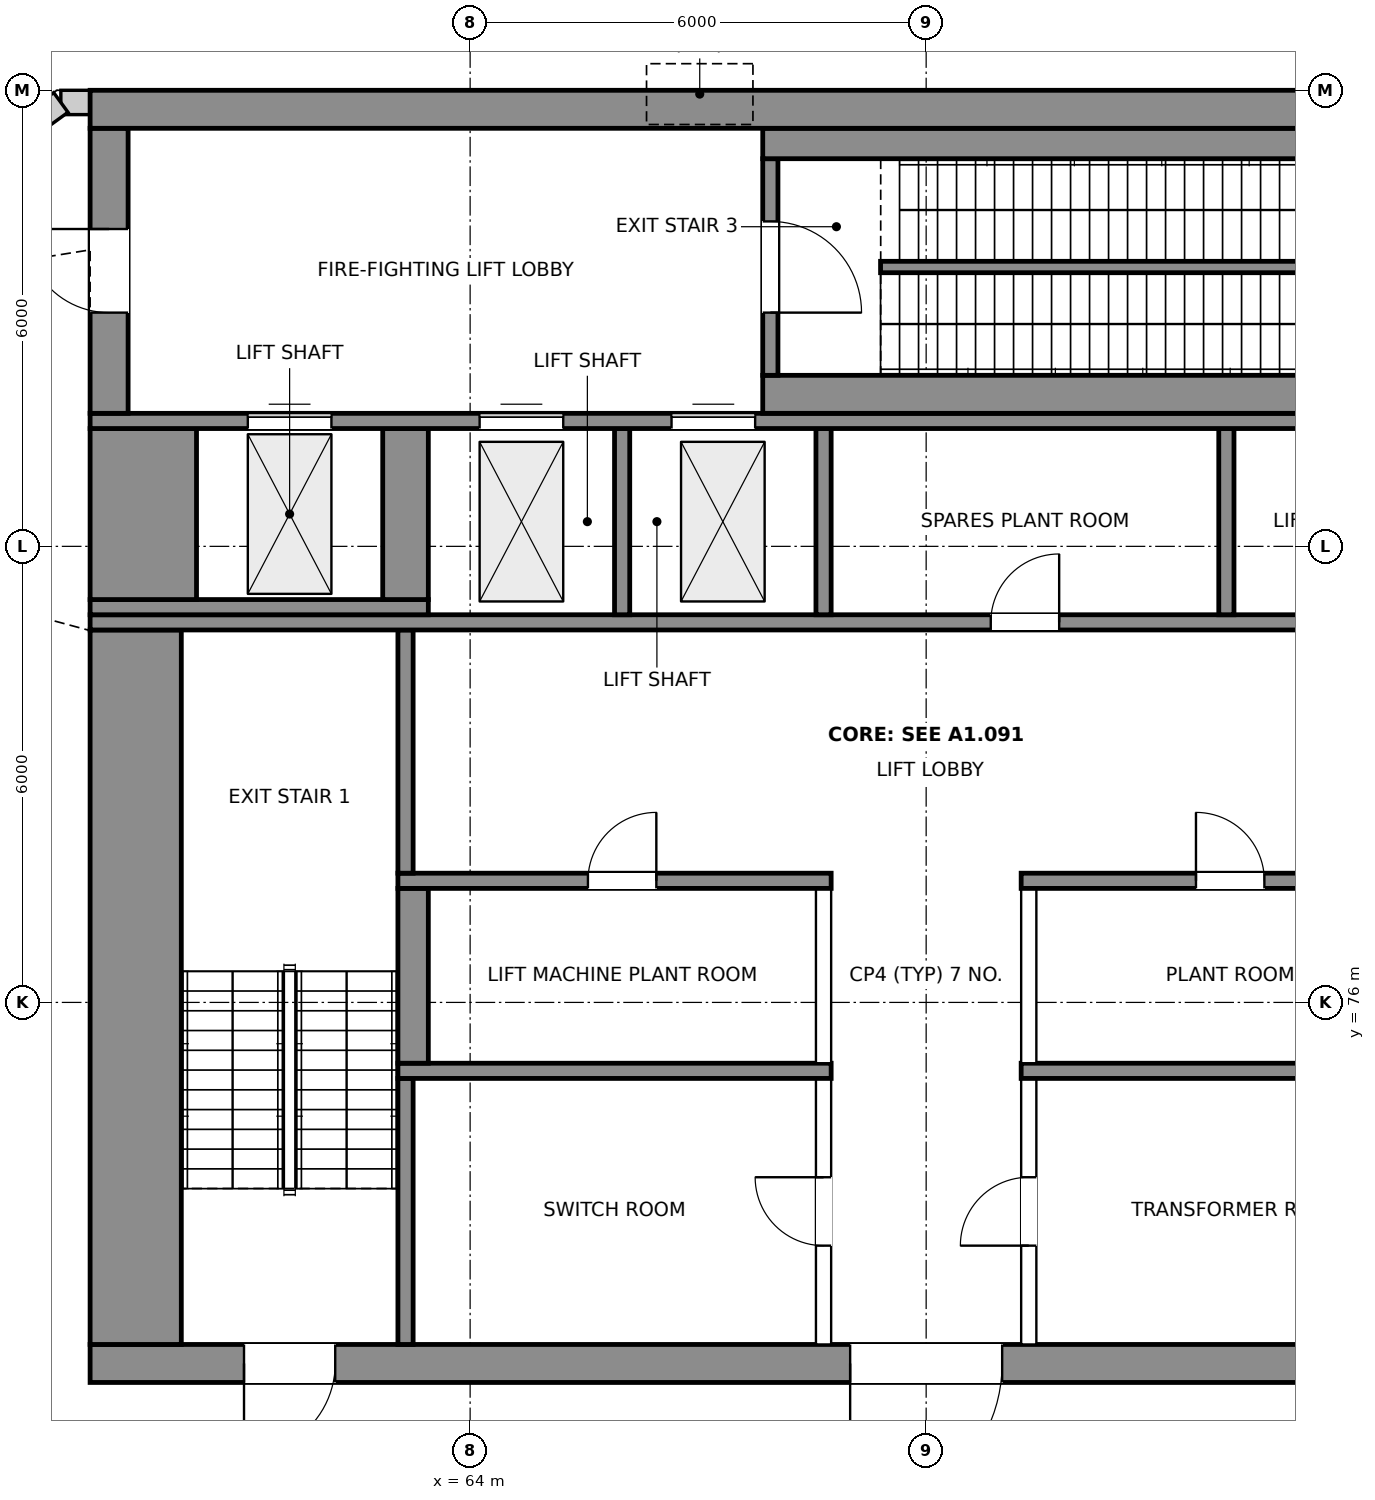
"""IFC4 building model, lengths in metres.
Left out: names, types, materials, properties, quantities, classifications, styles, units other than length and angle.
Written with IfcOpenShell. Run it as: python <this file> out.ifc"""

import sys

from ifc_helpers import new_model, si_unit, direction, frame, frame_2d, origin, place, context, subcontext, project, spatial, rectangle, extrude, element, fill, save


model = new_model("IFC4")
c1 = context("Model", 3, precision=1e-05, world=origin(), true_north=direction((0.0, 1.0)))
c2 = subcontext(c1, "Body", "Model", "MODEL_VIEW")
j1 = project(units=[si_unit("LENGTHUNIT", "METRE"), si_unit("PLANEANGLEUNIT", "RADIAN")], contexts=[c1])
p1 = place(None, origin())
s1 = spatial("IfcSite", under=j1, at=p1, CompositionType="ELEMENT")
p2 = place(p1, origin())
s2 = spatial("IfcBuilding", under=s1, at=p2, CompositionType="ELEMENT")
p3 = place(p2, frame((0.0, 0.0, 328.7)))
s3 = spatial("IfcBuildingStorey", under=s2, at=p3, CompositionType="ELEMENT", Elevation=328.7)
p4 = place(p3, frame((59.0, 87.84, 0.0), z_axis=(0.0, 0.0, 1.0), x_axis=(-1.0, 0.0, 0.0)))
e1 = element("IfcWall", 1, at=p4, inside=s3, PredefinedType="SOLIDWALL", context=c2, shape_type="SweptSolid", body=[
    extrude(rectangle(XDim=0.385, YDim=0.32, at=frame_2d((0.192, 0.0))), origin(), (0.0, 0.0, 1.0), 4.2),
])
p5 = place(p3, frame((58.615, 87.84, 0.0), z_axis=(0.0, 0.0, 1.0), x_axis=(-0.809014901919, -0.5877881323, 0.0)))
e2 = element("IfcWall", 2, at=p5, inside=s3, PredefinedType="SOLIDWALL", context=c2, shape_type="SweptSolid", body=[
    extrude(rectangle(XDim=5.678, YDim=0.32, at=frame_2d((2.839, 0.0))), origin(), (0.0, 0.0, 1.0), 4.2),
])
p6 = place(p3, frame((59.0, 71.25, 0.0), z_axis=(0.0, 0.0, 1.0), x_axis=(1.0, 0.0, 0.0)))
e3 = element("IfcWall", 3, at=p6, inside=s3, PredefinedType="SHEAR", context=c2, shape_type="SweptSolid", body=[
    extrude(rectangle(XDim=22.0, YDim=0.5, at=frame_2d((11.0, 0.0))), origin(), (0.0, 0.0, 1.0), 4.5),
])
p7 = place(p6, frame((2.025, 0.0, 0.0)))
e4 = element("IfcOpeningElement", 4, at=p7, cuts=e3, PredefinedType="OPENING", context=c2, shape_type="SweptSolid", body=[
    extrude(rectangle(XDim=1.2, YDim=2.1, at=frame_2d((0.6, 1.05))), frame((0.0, 0.26, 0.0), z_axis=(0.0, -1.0, 0.0), x_axis=(1.0, 0.0, 0.0)), (0.0, 0.0, 1.0), 0.52),
])
p8 = place(p6, frame((18.775, 0.0, 0.0)))
e5 = element("IfcOpeningElement", 5, at=p8, cuts=e3, PredefinedType="OPENING", context=c2, shape_type="SweptSolid", body=[
    extrude(rectangle(XDim=1.2, YDim=2.1, at=frame_2d((0.6, 1.05))), frame((0.0, 0.26, 0.0), z_axis=(0.0, -1.0, 0.0), x_axis=(1.0, 0.0, 0.0)), (0.0, 0.0, 1.0), 0.52),
])
p9 = place(p6, frame((10.0, 0.0, 0.0)))
e6 = element("IfcOpeningElement", 6, at=p9, cuts=e3, PredefinedType="OPENING", context=c2, shape_type="SweptSolid", body=[
    extrude(rectangle(XDim=2.0, YDim=2.1, at=frame_2d((1.0, 1.05))), frame((0.0, 0.26, 0.0), z_axis=(0.0, -1.0, 0.0), x_axis=(1.0, 0.0, 0.0)), (0.0, 0.0, 1.0), 0.52),
])
p10 = place(p3, frame((59.6, 71.5, 0.0), z_axis=(0.0, 0.0, 1.0), x_axis=(0.0, 1.0, 0.0)))
e7 = element("IfcWall", 7, at=p10, inside=s3, PredefinedType="SHEAR", context=c2, shape_type="SweptSolid", body=[
    extrude(rectangle(XDim=9.4, YDim=1.2, at=frame_2d((4.7, 0.0))), origin(), (0.0, 0.0, 1.0), 4.5),
])
p11 = place(p3, frame((63.15, 71.5, 0.0), z_axis=(0.0, 0.0, 1.0), x_axis=(0.0, 1.0, 0.0)))
e8 = element("IfcWall", 8, at=p11, inside=s3, PredefinedType="SHEAR", context=c2, shape_type="SweptSolid", body=[
    extrude(rectangle(XDim=3.5, YDim=0.2, at=frame_2d((1.75, 0.0))), origin(), (0.0, 0.0, 1.0), 4.5),
])
p12 = place(p3, frame((68.65, 71.5, 0.0), z_axis=(0.0, 0.0, 1.0), x_axis=(0.0, 1.0, 0.0)))
e9 = element("IfcWall", 9, at=p12, inside=s3, PredefinedType="PARTITIONING", context=c2, shape_type="SweptSolid", body=[
    extrude(rectangle(XDim=3.5, YDim=0.2, at=frame_2d((1.75, 0.0))), origin(), (0.0, 0.0, 1.0), 4.2),
])
p13 = place(p12, frame((1.3, 0.0, 0.0)))
e10 = element("IfcOpeningElement", 10, at=p13, cuts=e9, PredefinedType="OPENING", context=c2, shape_type="SweptSolid", body=[
    extrude(rectangle(XDim=0.9, YDim=2.1, at=frame_2d((0.45, 1.05))), frame((0.0, 0.11, 0.0), z_axis=(0.0, -1.0, 0.0), x_axis=(1.0, 0.0, 0.0)), (0.0, 0.0, 1.0), 0.22),
])
p14 = place(p3, frame((71.35, 71.5, 0.0), z_axis=(0.0, 0.0, 1.0), x_axis=(0.0, 1.0, 0.0)))
e11 = element("IfcWall", 11, at=p14, inside=s3, PredefinedType="PARTITIONING", context=c2, shape_type="SweptSolid", body=[
    extrude(rectangle(XDim=3.5, YDim=0.2, at=frame_2d((1.75, 0.0))), origin(), (0.0, 0.0, 1.0), 4.2),
])
p15 = place(p14, frame((1.3, 0.0, 0.0)))
e12 = element("IfcOpeningElement", 12, at=p15, cuts=e11, PredefinedType="OPENING", context=c2, shape_type="SweptSolid", body=[
    extrude(rectangle(XDim=0.9, YDim=2.1, at=frame_2d((0.45, 1.05))), frame((0.0, 0.11, 0.0), z_axis=(0.0, -1.0, 0.0), x_axis=(1.0, 0.0, 0.0)), (0.0, 0.0, 1.0), 0.22),
])
for number, where, z_axis, x_axis in (
    (13, (63.05, 75.1, 0.0), (0.0, 0.0, 1.0), (1.0, 0.0, 0.0)),
    (14, (71.25, 75.1, 0.0), (0.0, 0.0, 1.0), (1.0, 0.0, 0.0)),
):
    element("IfcWall", number, at=place(p3, frame(where, z_axis=z_axis, x_axis=x_axis)), inside=s3, PredefinedType="SHEAR", context=c2, shape_type="SweptSolid", body=[
        extrude(rectangle(XDim=5.7, YDim=0.2, at=frame_2d((2.85, 0.0))), origin(), (0.0, 0.0, 1.0), 4.5),
    ])
p16 = place(p3, frame((63.25, 75.2, 0.0), z_axis=(0.0, 0.0, 1.0), x_axis=(0.0, 1.0, 0.0)))
e15 = element("IfcWall", 15, at=p16, inside=s3, PredefinedType="SHEAR", context=c2, shape_type="SweptSolid", body=[
    extrude(rectangle(XDim=2.3, YDim=0.4, at=frame_2d((1.15, 0.0))), origin(), (0.0, 0.0, 1.0), 4.5),
])
for number, where, z_axis, x_axis in (
    (16, (68.65, 75.2, 0.0), (0.0, 0.0, 1.0), (0.0, 1.0, 0.0)),
    (17, (71.35, 75.2, 0.0), (0.0, 0.0, 1.0), (0.0, 1.0, 0.0)),
):
    element("IfcWall", number, at=place(p3, frame(where, z_axis=z_axis, x_axis=x_axis)), inside=s3, PredefinedType="PARTITIONING", context=c2, shape_type="SweptSolid", body=[
        extrude(rectangle(XDim=2.3, YDim=0.2, at=frame_2d((1.15, 0.0))), origin(), (0.0, 0.0, 1.0), 4.2),
    ])
p17 = place(p3, frame((63.05, 77.6, 0.0), z_axis=(0.0, 0.0, 1.0), x_axis=(1.0, 0.0, 0.0)))
e18 = element("IfcWall", 18, at=p17, inside=s3, PredefinedType="SHEAR", context=c2, shape_type="SweptSolid", body=[
    extrude(rectangle(XDim=5.7, YDim=0.2, at=frame_2d((2.85, 0.0))), origin(), (0.0, 0.0, 1.0), 4.5),
])
p18 = place(p17, frame((2.5, 0.0, 0.0)))
e19 = element("IfcOpeningElement", 19, at=p18, cuts=e18, PredefinedType="OPENING", context=c2, shape_type="SweptSolid", body=[
    extrude(rectangle(XDim=0.9, YDim=2.1, at=frame_2d((0.45, 1.05))), frame((0.0, 0.11, 0.0), z_axis=(0.0, -1.0, 0.0), x_axis=(1.0, 0.0, 0.0)), (0.0, 0.0, 1.0), 0.22),
])
p19 = place(p3, frame((71.25, 77.6, 0.0), z_axis=(0.0, 0.0, 1.0), x_axis=(1.0, 0.0, 0.0)))
e20 = element("IfcWall", 20, at=p19, inside=s3, PredefinedType="SHEAR", context=c2, shape_type="SweptSolid", body=[
    extrude(rectangle(XDim=5.7, YDim=0.2, at=frame_2d((2.85, 0.0))), origin(), (0.0, 0.0, 1.0), 4.5),
])
p20 = place(p19, frame((2.3, 0.0, 0.0)))
e21 = element("IfcOpeningElement", 21, at=p20, cuts=e20, PredefinedType="OPENING", context=c2, shape_type="SweptSolid", body=[
    extrude(rectangle(XDim=0.9, YDim=2.1, at=frame_2d((0.45, 1.05))), frame((0.0, 0.11, 0.0), z_axis=(0.0, -1.0, 0.0), x_axis=(1.0, 0.0, 0.0)), (0.0, 0.0, 1.0), 0.22),
])
p21 = place(p3, frame((63.15, 77.7, 0.0), z_axis=(0.0, 0.0, 1.0), x_axis=(0.0, 1.0, 0.0)))
e22 = element("IfcWall", 22, at=p21, inside=s3, PredefinedType="SHEAR", context=c2, shape_type="SweptSolid", body=[
    extrude(rectangle(XDim=3.2, YDim=0.2, at=frame_2d((1.6, 0.0))), origin(), (0.0, 0.0, 1.0), 4.5),
])
p22 = place(p3, frame((59.0, 81.0, 0.0), z_axis=(0.0, 0.0, 1.0), x_axis=(1.0, 0.0, 0.0)))
e23 = element("IfcWall", 23, at=p22, inside=s3, PredefinedType="SHEAR", context=c2, shape_type="SweptSolid", body=[
    extrude(rectangle(XDim=22.0, YDim=0.2, at=frame_2d((11.0, 0.0))), origin(), (0.0, 0.0, 1.0), 4.5),
])
p23 = place(p22, frame((11.85, 0.0, 0.0)))
e24 = element("IfcOpeningElement", 24, at=p23, cuts=e23, PredefinedType="OPENING", context=c2, shape_type="SweptSolid", body=[
    extrude(rectangle(XDim=0.9, YDim=2.1, at=frame_2d((0.45, 1.05))), frame((0.0, 0.11, 0.0), z_axis=(0.0, -1.0, 0.0), x_axis=(1.0, 0.0, 0.0)), (0.0, 0.0, 1.0), 0.22),
])
p24 = place(p3, frame((59.0, 81.2, 0.0), z_axis=(0.0, 0.0, 1.0), x_axis=(1.0, 0.0, 0.0)))
e25 = element("IfcWall", 25, at=p24, inside=s3, PredefinedType="SHEAR", context=c2, shape_type="SweptSolid", body=[
    extrude(rectangle(XDim=4.45, YDim=0.2, at=frame_2d((2.225, 0.0))), origin(), (0.0, 0.0, 1.0), 4.5),
])
for number, where, z_axis, x_axis in (
    (26, (66.0, 81.1, 0.0), (0.0, 0.0, 1.0), (0.0, 1.0, 0.0)),
    (27, (68.65, 81.1, 0.0), (0.0, 0.0, 1.0), (0.0, 1.0, 0.0)),
    (28, (73.95, 81.1, 0.0), (0.0, 0.0, 1.0), (0.0, 1.0, 0.0)),
):
    element("IfcWall", number, at=place(p3, frame(where, z_axis=z_axis, x_axis=x_axis)), inside=s3, PredefinedType="SHEAR", context=c2, shape_type="SweptSolid", body=[
        extrude(rectangle(XDim=2.45, YDim=0.2, at=frame_2d((1.225, 0.0))), origin(), (0.0, 0.0, 1.0), 4.5),
    ])
p25 = place(p3, frame((59.7, 81.3, 0.0), z_axis=(0.0, 0.0, 1.0), x_axis=(0.0, 1.0, 0.0)))
e29 = element("IfcWall", 29, at=p25, inside=s3, PredefinedType="SHEAR", context=c2, shape_type="SweptSolid", body=[
    extrude(rectangle(XDim=2.25, YDim=1.4, at=frame_2d((1.125, 0.0))), origin(), (0.0, 0.0, 1.0), 4.5),
])
p26 = place(p3, frame((63.15, 81.3, 0.0), z_axis=(0.0, 0.0, 1.0), x_axis=(0.0, 1.0, 0.0)))
e30 = element("IfcWall", 30, at=p26, inside=s3, PredefinedType="SHEAR", context=c2, shape_type="SweptSolid", body=[
    extrude(rectangle(XDim=2.25, YDim=0.6, at=frame_2d((1.125, 0.0))), origin(), (0.0, 0.0, 1.0), 4.5),
])
p27 = place(p3, frame((59.0, 83.65, 0.0), z_axis=(0.0, 0.0, 1.0), x_axis=(1.0, 0.0, 0.0)))
e31 = element("IfcWall", 31, at=p27, inside=s3, PredefinedType="SHEAR", context=c2, shape_type="SweptSolid", body=[
    extrude(rectangle(XDim=22.0, YDim=0.2, at=frame_2d((11.0, 0.0))), origin(), (0.0, 0.0, 1.0), 4.5),
])
p28 = place(p27, frame((5.125, 0.0, 0.0)))
e32 = element("IfcOpeningElement", 32, at=p28, cuts=e31, PredefinedType="OPENING", context=c2, shape_type="SweptSolid", body=[
    extrude(rectangle(XDim=1.1, YDim=2.1, at=frame_2d((0.55, 1.05))), frame((0.0, 0.11, 0.0), z_axis=(0.0, -1.0, 0.0), x_axis=(1.0, 0.0, 0.0)), (0.0, 0.0, 1.0), 0.22),
])
p29 = place(p27, frame((7.65, 0.0, 0.0)))
e33 = element("IfcOpeningElement", 33, at=p29, cuts=e31, PredefinedType="OPENING", context=c2, shape_type="SweptSolid", body=[
    extrude(rectangle(XDim=1.1, YDim=2.1, at=frame_2d((0.55, 1.05))), frame((0.0, 0.11, 0.0), z_axis=(0.0, -1.0, 0.0), x_axis=(1.0, 0.0, 0.0)), (0.0, 0.0, 1.0), 0.22),
])
p30 = place(p27, frame((18.775, 0.0, 0.0)))
e34 = element("IfcOpeningElement", 34, at=p30, cuts=e31, PredefinedType="OPENING", context=c2, shape_type="SweptSolid", body=[
    extrude(rectangle(XDim=1.2, YDim=2.1, at=frame_2d((0.6, 1.05))), frame((0.0, 0.11, 0.0), z_axis=(0.0, -1.0, 0.0), x_axis=(1.0, 0.0, 0.0)), (0.0, 0.0, 1.0), 0.22),
])
p31 = place(p27, frame((2.075, 0.0, 0.0)))
e35 = element("IfcOpeningElement", 35, at=p31, cuts=e31, PredefinedType="OPENING", context=c2, shape_type="SweptSolid", body=[
    extrude(rectangle(XDim=1.1, YDim=2.1, at=frame_2d((0.55, 1.05))), frame((0.0, 0.11, 0.0), z_axis=(0.0, -1.0, 0.0), x_axis=(1.0, 0.0, 0.0)), (0.0, 0.0, 1.0), 0.22),
])
p32 = place(p3, frame((59.25, 83.75, 0.0), z_axis=(0.0, 0.0, 1.0), x_axis=(0.0, 1.0, 0.0)))
e36 = element("IfcWall", 36, at=p32, inside=s3, PredefinedType="SHEAR", context=c2, shape_type="SweptSolid", body=[
    extrude(rectangle(XDim=3.75, YDim=0.5, at=frame_2d((1.875, 0.0))), origin(), (0.0, 0.0, 1.0), 4.5),
])
p33 = place(p32, frame((1.325, 0.0, 0.0)))
e37 = element("IfcOpeningElement", 37, at=p33, cuts=e36, PredefinedType="OPENING", context=c2, shape_type="SweptSolid", body=[
    extrude(rectangle(XDim=1.1, YDim=2.1, at=frame_2d((0.55, 1.05))), frame((0.0, 0.26, 0.0), z_axis=(0.0, -1.0, 0.0), x_axis=(1.0, 0.0, 0.0)), (0.0, 0.0, 1.0), 0.52),
])
p34 = place(p3, frame((67.85, 84.0, 0.0), z_axis=(0.0, 0.0, 1.0), x_axis=(1.0, 0.0, 0.0)))
e38 = element("IfcWall", 38, at=p34, inside=s3, PredefinedType="SHEAR", context=c2, shape_type="SweptSolid", body=[
    extrude(rectangle(XDim=9.1, YDim=0.5, at=frame_2d((4.55, 0.0))), origin(), (0.0, 0.0, 1.0), 4.5),
])
p35 = place(p3, frame((67.95, 84.25, 0.0), z_axis=(0.0, 0.0, 1.0), x_axis=(0.0, 1.0, 0.0)))
e39 = element("IfcWall", 39, at=p35, inside=s3, PredefinedType="SHEAR", context=c2, shape_type="SweptSolid", body=[
    extrude(rectangle(XDim=2.85, YDim=0.2, at=frame_2d((1.425, 0.0))), origin(), (0.0, 0.0, 1.0), 4.5),
])
p36 = place(p35, frame((0.825, 0.0, 0.0)))
e40 = element("IfcOpeningElement", 40, at=p36, cuts=e39, PredefinedType="OPENING", context=c2, shape_type="SweptSolid", body=[
    extrude(rectangle(XDim=1.2, YDim=2.1, at=frame_2d((0.6, 1.05))), frame((0.0, 0.11, 0.0), z_axis=(0.0, -1.0, 0.0), x_axis=(1.0, 0.0, 0.0)), (0.0, 0.0, 1.0), 0.22),
])
p37 = place(p3, frame((67.85, 87.3, 0.0), z_axis=(0.0, 0.0, 1.0), x_axis=(1.0, 0.0, 0.0)))
e41 = element("IfcWall", 41, at=p37, inside=s3, PredefinedType="SHEAR", context=c2, shape_type="SweptSolid", body=[
    extrude(rectangle(XDim=9.1, YDim=0.4, at=frame_2d((4.55, 0.0))), origin(), (0.0, 0.0, 1.0), 4.5),
])
p38 = place(p3, frame((59.0, 87.75, 0.0), z_axis=(0.0, 0.0, 1.0), x_axis=(1.0, 0.0, 0.0)))
e42 = element("IfcWall", 42, at=p38, inside=s3, PredefinedType="SHEAR", context=c2, shape_type="SweptSolid", body=[
    extrude(rectangle(XDim=22.0, YDim=0.5, at=frame_2d((11.0, 0.0))), origin(), (0.0, 0.0, 1.0), 4.5),
])
p39 = place(p3, frame((69.4, 85.675, 0.0), z_axis=(0.0, 0.0, 1.0), x_axis=(1.0, 0.0, 0.0)))
e43 = element("IfcWall", 43, at=p39, inside=s3, PredefinedType="SHEAR", context=c2, shape_type="SweptSolid", body=[
    extrude(rectangle(XDim=6.0, YDim=0.15, at=frame_2d((3.0, 0.0))), origin(), (0.0, 0.0, 1.0), 4.5),
])
p40 = place(p7, frame((1.2, 0.0, 0.0), z_axis=(0.0, 0.0, 1.0), x_axis=(-1.0, 0.0, 0.0)))
e44 = element("IfcDoor", 44, at=p40, inside=s3, OperationType="SINGLE_SWING_RIGHT", PredefinedType="DOOR", context=c2, shape_type="SweptSolid", body=[
    extrude(rectangle(XDim=1.2, YDim=2.1, at=frame_2d((0.6, 1.05))), frame((0.0, 0.025, 0.0), z_axis=(0.0, -1.0, 0.0), x_axis=(1.0, 0.0, 0.0)), (0.0, 0.0, 1.0), 0.05),
])
fill(e4, e44)
p41 = place(p36, frame((1.2, 0.0, 0.0), z_axis=(0.0, 0.0, 1.0), x_axis=(-1.0, 0.0, 0.0)))
e45 = element("IfcDoor", 45, at=p41, inside=s3, OperationType="SINGLE_SWING_RIGHT", PredefinedType="DOOR", context=c2, shape_type="SweptSolid", body=[
    extrude(rectangle(XDim=1.2, YDim=2.1, at=frame_2d((0.6, 1.05))), frame((0.0, 0.025, 0.0), z_axis=(0.0, -1.0, 0.0), x_axis=(1.0, 0.0, 0.0)), (0.0, 0.0, 1.0), 0.05),
])
fill(e40, e45)
p42 = place(p9, frame((2.0, 0.0, 0.0), z_axis=(0.0, 0.0, 1.0), x_axis=(-1.0, 0.0, 0.0)))
e46 = element("IfcDoor", 46, at=p42, inside=s3, OperationType="DOUBLE_DOOR_SINGLE_SWING", PredefinedType="DOOR", context=c2, shape_type="SweptSolid", body=[
    extrude(rectangle(XDim=2.0, YDim=2.1, at=frame_2d((1.0, 1.05))), frame((0.0, 0.025, 0.0), z_axis=(0.0, -1.0, 0.0), x_axis=(1.0, 0.0, 0.0)), (0.0, 0.0, 1.0), 0.05),
])
fill(e6, e46)
p43 = place(p13, origin())
e47 = element("IfcDoor", 47, at=p43, inside=s3, OperationType="SINGLE_SWING_RIGHT", PredefinedType="DOOR", context=c2, shape_type="SweptSolid", body=[
    extrude(rectangle(XDim=0.9, YDim=2.1, at=frame_2d((0.45, 1.05))), frame((0.0, 0.025, 0.0), z_axis=(0.0, -1.0, 0.0), x_axis=(1.0, 0.0, 0.0)), (0.0, 0.0, 1.0), 0.05),
])
fill(e10, e47)
p44 = place(p15, origin())
e48 = element("IfcDoor", 48, at=p44, inside=s3, OperationType="SINGLE_SWING_LEFT", PredefinedType="DOOR", context=c2, shape_type="SweptSolid", body=[
    extrude(rectangle(XDim=0.9, YDim=2.1, at=frame_2d((0.45, 1.05))), frame((0.0, 0.025, 0.0), z_axis=(0.0, -1.0, 0.0), x_axis=(1.0, 0.0, 0.0)), (0.0, 0.0, 1.0), 0.05),
])
fill(e12, e48)
p45 = place(p33, origin())
e49 = element("IfcDoor", 49, at=p45, inside=s3, OperationType="SINGLE_SWING_RIGHT", PredefinedType="DOOR", context=c2, shape_type="SweptSolid", body=[
    extrude(rectangle(XDim=1.1, YDim=2.1, at=frame_2d((0.55, 1.05))), frame((0.0, 0.025, 0.0), z_axis=(0.0, -1.0, 0.0), x_axis=(1.0, 0.0, 0.0)), (0.0, 0.0, 1.0), 0.05),
])
fill(e37, e49)
p46 = place(p28, origin())
e50 = element("IfcDoor", 50, at=p46, inside=s3, OperationType="DOUBLE_DOOR_SLIDING", PredefinedType="DOOR", context=c2, shape_type="SweptSolid", body=[
    extrude(rectangle(XDim=1.1, YDim=2.1, at=frame_2d((0.55, 1.05))), frame((0.0, 0.025, 0.0), z_axis=(0.0, -1.0, 0.0), x_axis=(1.0, 0.0, 0.0)), (0.0, 0.0, 1.0), 0.05),
])
fill(e32, e50)
p47 = place(p29, origin())
e51 = element("IfcDoor", 51, at=p47, inside=s3, OperationType="DOUBLE_DOOR_SLIDING", PredefinedType="DOOR", context=c2, shape_type="SweptSolid", body=[
    extrude(rectangle(XDim=1.1, YDim=2.1, at=frame_2d((0.55, 1.05))), frame((0.0, 0.025, 0.0), z_axis=(0.0, -1.0, 0.0), x_axis=(1.0, 0.0, 0.0)), (0.0, 0.0, 1.0), 0.05),
])
fill(e33, e51)
p48 = place(p31, origin())
e52 = element("IfcDoor", 52, at=p48, inside=s3, OperationType="DOUBLE_DOOR_SLIDING", PredefinedType="DOOR", context=c2, shape_type="SweptSolid", body=[
    extrude(rectangle(XDim=1.1, YDim=2.1, at=frame_2d((0.55, 1.05))), frame((0.0, 0.025, 0.0), z_axis=(0.0, -1.0, 0.0), x_axis=(1.0, 0.0, 0.0)), (0.0, 0.0, 1.0), 0.05),
])
fill(e35, e52)
p49 = place(p18, origin())
e53 = element("IfcDoor", 53, at=p49, inside=s3, OperationType="SINGLE_SWING_RIGHT", PredefinedType="DOOR", context=c2, shape_type="SweptSolid", body=[
    extrude(rectangle(XDim=0.9, YDim=2.1, at=frame_2d((0.45, 1.05))), frame((0.0, 0.025, 0.0), z_axis=(0.0, -1.0, 0.0), x_axis=(1.0, 0.0, 0.0)), (0.0, 0.0, 1.0), 0.05),
])
fill(e19, e53)
p50 = place(p20, origin())
e54 = element("IfcDoor", 54, at=p50, inside=s3, OperationType="SINGLE_SWING_LEFT", PredefinedType="DOOR", context=c2, shape_type="SweptSolid", body=[
    extrude(rectangle(XDim=0.9, YDim=2.1, at=frame_2d((0.45, 1.05))), frame((0.0, 0.025, 0.0), z_axis=(0.0, -1.0, 0.0), x_axis=(1.0, 0.0, 0.0)), (0.0, 0.0, 1.0), 0.05),
])
fill(e21, e54)
p51 = place(p23, origin())
e55 = element("IfcDoor", 55, at=p51, inside=s3, OperationType="SINGLE_SWING_RIGHT", PredefinedType="DOOR", context=c2, shape_type="SweptSolid", body=[
    extrude(rectangle(XDim=0.9, YDim=2.1, at=frame_2d((0.45, 1.05))), frame((0.0, 0.025, 0.0), z_axis=(0.0, -1.0, 0.0), x_axis=(1.0, 0.0, 0.0)), (0.0, 0.0, 1.0), 0.05),
])
fill(e24, e55)
save(model, sys.argv[1])
